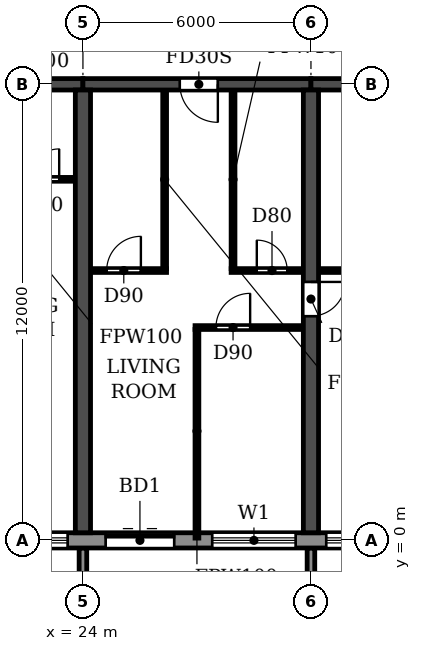
"""IFC4 building model, lengths in metres.
Left out: names, types, materials, properties, quantities, classifications, styles, units other than length and angle.
Written with IfcOpenShell. Run it as: python <this file> out.ifc"""

import sys

from ifc_helpers import new_model, si_unit, direction, frame, frame_2d, origin, place, context, subcontext, project, spatial, polyline, rectangle, outline, extrude, source, transform, mapped, element, fill, save


model = new_model("IFC4")
c1 = context("Model", 3, precision=1e-05, world=origin(), true_north=direction((0.0, 1.0)))
c2 = subcontext(c1, "Body", "Model", "MODEL_VIEW")
j1 = project(units=[si_unit("LENGTHUNIT", "METRE"), si_unit("PLANEANGLEUNIT", "RADIAN")], contexts=[c1])
p1 = place(None, origin())
s1 = spatial("IfcSite", under=j1, at=p1, CompositionType="ELEMENT")
p2 = place(p1, origin())
s2 = spatial("IfcBuilding", under=s1, at=p2, CompositionType="ELEMENT")
p3 = place(p2, frame((0.0, 0.0, 26.7)))
s3 = spatial("IfcBuildingStorey", under=s2, at=p3, CompositionType="ELEMENT", Elevation=26.7)
p4 = place(p3, frame((24.0, 0.2, 0.0), z_axis=(0.0, 0.0, 1.0), x_axis=(0.0, 1.0, 0.0)))
e1 = element("IfcWall", 1, at=p4, inside=s3, PredefinedType="SHEAR", context=c2, shape_type="SweptSolid", body=[
    extrude(rectangle(XDim=11.65, YDim=0.4, at=frame_2d((5.825, 0.0))), origin(), (0.0, 0.0, 1.0), 3.05),
])
p5 = place(p3, frame((30.0, 0.2, 0.0), z_axis=(0.0, 0.0, 1.0), x_axis=(0.0, 1.0, 0.0)))
e2 = element("IfcWall", 2, at=p5, inside=s3, PredefinedType="SHEAR", context=c2, shape_type="SweptSolid", body=[
    extrude(rectangle(XDim=11.65, YDim=0.4, at=frame_2d((5.825, 0.0))), origin(), (0.0, 0.0, 1.0), 3.05),
])
p6 = place(p5, frame((5.7, 0.0, 0.0)))
e3 = element("IfcOpeningElement", 3, at=p6, cuts=e2, PredefinedType="OPENING", context=c2, shape_type="SweptSolid", body=[
    extrude(rectangle(XDim=0.9, YDim=2.1, at=frame_2d((0.45, 1.05))), frame((0.0, 0.21, 0.0), z_axis=(0.0, -1.0, 0.0), x_axis=(1.0, 0.0, 0.0)), (0.0, 0.0, 1.0), 0.42),
])
p7 = place(p3, frame((18.0, 12.0, 0.0), z_axis=(0.0, 0.0, 1.0), x_axis=(1.0, 0.0, 0.0)))
e4 = element("IfcWall", 4, at=p7, inside=s3, PredefinedType="SHEAR", context=c2, shape_type="SweptSolid", body=[
    extrude(rectangle(XDim=6.0, YDim=0.3, at=frame_2d((3.0, 0.0))), origin(), (0.0, 0.0, 1.0), 2.45),
])
p8 = place(p7, frame((2.55, 0.0, 0.0)))
e5 = element("IfcOpeningElement", 5, at=p8, cuts=e4, PredefinedType="OPENING", context=c2, shape_type="SweptSolid", body=[
    extrude(rectangle(XDim=1.0, YDim=2.1, at=frame_2d((0.5, 1.05))), frame((0.0, 0.16, 0.0), z_axis=(0.0, -1.0, 0.0), x_axis=(1.0, 0.0, 0.0)), (0.0, 0.0, 1.0), 0.32),
])
p9 = place(p3, frame((24.0, 12.0, 0.0), z_axis=(0.0, 0.0, 1.0), x_axis=(1.0, 0.0, 0.0)))
e6 = element("IfcWall", 6, at=p9, inside=s3, PredefinedType="SHEAR", context=c2, shape_type="SweptSolid", body=[
    extrude(rectangle(XDim=6.0, YDim=0.3, at=frame_2d((3.0, 0.0))), origin(), (0.0, 0.0, 1.0), 2.45),
])
p10 = place(p9, frame((2.55, 0.0, 0.0)))
e7 = element("IfcOpeningElement", 7, at=p10, cuts=e6, PredefinedType="OPENING", context=c2, shape_type="SweptSolid", body=[
    extrude(rectangle(XDim=1.0, YDim=2.1, at=frame_2d((0.5, 1.05))), frame((0.0, 0.16, 0.0), z_axis=(0.0, -1.0, 0.0), x_axis=(1.0, 0.0, 0.0)), (0.0, 0.0, 1.0), 0.32),
])
p11 = place(p3, frame((30.0, 12.0, 0.0), z_axis=(0.0, 0.0, 1.0), x_axis=(1.0, 0.0, 0.0)))
e8 = element("IfcWall", 8, at=p11, inside=s3, PredefinedType="SHEAR", context=c2, shape_type="SweptSolid", body=[
    extrude(rectangle(XDim=6.0, YDim=0.3, at=frame_2d((3.0, 0.0))), origin(), (0.0, 0.0, 1.0), 2.45),
])
p12 = place(p3, frame((4.683, 0.0, 0.0), z_axis=(0.0, 0.0, 1.0), x_axis=(1.0, 0.0, 0.0)))
e9 = element("IfcWall", 9, at=p12, inside=s3, PredefinedType="STANDARD", context=c2, shape_type="SweptSolid", body=[
    extrude(rectangle(XDim=92.634, YDim=0.4, at=frame_2d((46.317, 0.0))), origin(), (0.0, 0.0, 1.0), 3.05),
])
p13 = place(p12, frame((1.717, 0.0, 0.9)))
e10 = element("IfcOpeningElement", 10, at=p13, cuts=e9, PredefinedType="OPENING", context=c2, shape_type="SweptSolid", body=[
    extrude(rectangle(XDim=2.2, YDim=1.5, at=frame_2d((1.1, 0.75))), frame((0.0, 0.21, 0.0), z_axis=(0.0, -1.0, 0.0), x_axis=(1.0, 0.0, 0.0)), (0.0, 0.0, 1.0), 0.42),
])
p14 = place(p12, frame((4.717, 0.0, 0.9)))
e11 = element("IfcOpeningElement", 11, at=p14, cuts=e9, PredefinedType="OPENING", context=c2, shape_type="SweptSolid", body=[
    extrude(rectangle(XDim=2.2, YDim=1.5, at=frame_2d((1.1, 0.75))), frame((0.0, 0.21, 0.0), z_axis=(0.0, -1.0, 0.0), x_axis=(1.0, 0.0, 0.0)), (0.0, 0.0, 1.0), 0.42),
])
p15 = place(p12, frame((7.717, 0.0, 0.9)))
e12 = element("IfcOpeningElement", 12, at=p15, cuts=e9, PredefinedType="OPENING", context=c2, shape_type="SweptSolid", body=[
    extrude(rectangle(XDim=2.2, YDim=1.5, at=frame_2d((1.1, 0.75))), frame((0.0, 0.21, 0.0), z_axis=(0.0, -1.0, 0.0), x_axis=(1.0, 0.0, 0.0)), (0.0, 0.0, 1.0), 0.42),
])
p16 = place(p12, frame((10.717, 0.0, 0.9)))
e13 = element("IfcOpeningElement", 13, at=p16, cuts=e9, PredefinedType="OPENING", context=c2, shape_type="SweptSolid", body=[
    extrude(rectangle(XDim=2.2, YDim=1.5, at=frame_2d((1.1, 0.75))), frame((0.0, 0.21, 0.0), z_axis=(0.0, -1.0, 0.0), x_axis=(1.0, 0.0, 0.0)), (0.0, 0.0, 1.0), 0.42),
])
p17 = place(p12, frame((13.717, 0.0, 0.9)))
e14 = element("IfcOpeningElement", 14, at=p17, cuts=e9, PredefinedType="OPENING", context=c2, shape_type="SweptSolid", body=[
    extrude(rectangle(XDim=2.2, YDim=1.5, at=frame_2d((1.1, 0.75))), frame((0.0, 0.21, 0.0), z_axis=(0.0, -1.0, 0.0), x_axis=(1.0, 0.0, 0.0)), (0.0, 0.0, 1.0), 0.42),
])
p18 = place(p12, frame((16.717, 0.0, 0.9)))
e15 = element("IfcOpeningElement", 15, at=p18, cuts=e9, PredefinedType="OPENING", context=c2, shape_type="SweptSolid", body=[
    extrude(rectangle(XDim=2.2, YDim=1.5, at=frame_2d((1.1, 0.75))), frame((0.0, 0.21, 0.0), z_axis=(0.0, -1.0, 0.0), x_axis=(1.0, 0.0, 0.0)), (0.0, 0.0, 1.0), 0.42),
])
p19 = place(p12, frame((19.917, 0.0, 0.0)))
e16 = element("IfcOpeningElement", 16, at=p19, cuts=e9, PredefinedType="OPENING", context=c2, shape_type="SweptSolid", body=[
    extrude(rectangle(XDim=1.8, YDim=2.4, at=frame_2d((0.9, 1.2))), frame((0.0, 0.21, 0.0), z_axis=(0.0, -1.0, 0.0), x_axis=(1.0, 0.0, 0.0)), (0.0, 0.0, 1.0), 0.42),
])
p20 = place(p12, frame((22.717, 0.0, 0.9)))
e17 = element("IfcOpeningElement", 17, at=p20, cuts=e9, PredefinedType="OPENING", context=c2, shape_type="SweptSolid", body=[
    extrude(rectangle(XDim=2.2, YDim=1.5, at=frame_2d((1.1, 0.75))), frame((0.0, 0.21, 0.0), z_axis=(0.0, -1.0, 0.0), x_axis=(1.0, 0.0, 0.0)), (0.0, 0.0, 1.0), 0.42),
])
p21 = place(p12, frame((25.717, 0.0, 0.9)))
e18 = element("IfcOpeningElement", 18, at=p21, cuts=e9, PredefinedType="OPENING", context=c2, shape_type="SweptSolid", body=[
    extrude(rectangle(XDim=2.2, YDim=1.5, at=frame_2d((1.1, 0.75))), frame((0.0, 0.21, 0.0), z_axis=(0.0, -1.0, 0.0), x_axis=(1.0, 0.0, 0.0)), (0.0, 0.0, 1.0), 0.42),
])
p22 = place(p12, frame((28.717, 0.0, 0.9)))
e19 = element("IfcOpeningElement", 19, at=p22, cuts=e9, PredefinedType="OPENING", context=c2, shape_type="SweptSolid", body=[
    extrude(rectangle(XDim=2.2, YDim=1.5, at=frame_2d((1.1, 0.75))), frame((0.0, 0.21, 0.0), z_axis=(0.0, -1.0, 0.0), x_axis=(1.0, 0.0, 0.0)), (0.0, 0.0, 1.0), 0.42),
])
p23 = place(p12, frame((31.917, 0.0, 0.0)))
e20 = element("IfcOpeningElement", 20, at=p23, cuts=e9, PredefinedType="OPENING", context=c2, shape_type="SweptSolid", body=[
    extrude(rectangle(XDim=1.8, YDim=2.4, at=frame_2d((0.9, 1.2))), frame((0.0, 0.21, 0.0), z_axis=(0.0, -1.0, 0.0), x_axis=(1.0, 0.0, 0.0)), (0.0, 0.0, 1.0), 0.42),
])
p24 = place(p12, frame((34.717, 0.0, 0.9)))
e21 = element("IfcOpeningElement", 21, at=p24, cuts=e9, PredefinedType="OPENING", context=c2, shape_type="SweptSolid", body=[
    extrude(rectangle(XDim=2.2, YDim=1.5, at=frame_2d((1.1, 0.75))), frame((0.0, 0.21, 0.0), z_axis=(0.0, -1.0, 0.0), x_axis=(1.0, 0.0, 0.0)), (0.0, 0.0, 1.0), 0.42),
])
p25 = place(p12, frame((37.717, 0.0, 0.9)))
e22 = element("IfcOpeningElement", 22, at=p25, cuts=e9, PredefinedType="OPENING", context=c2, shape_type="SweptSolid", body=[
    extrude(rectangle(XDim=2.2, YDim=1.5, at=frame_2d((1.1, 0.75))), frame((0.0, 0.21, 0.0), z_axis=(0.0, -1.0, 0.0), x_axis=(1.0, 0.0, 0.0)), (0.0, 0.0, 1.0), 0.42),
])
p26 = place(p12, frame((40.717, 0.0, 0.9)))
e23 = element("IfcOpeningElement", 23, at=p26, cuts=e9, PredefinedType="OPENING", context=c2, shape_type="SweptSolid", body=[
    extrude(rectangle(XDim=2.2, YDim=1.5, at=frame_2d((1.1, 0.75))), frame((0.0, 0.21, 0.0), z_axis=(0.0, -1.0, 0.0), x_axis=(1.0, 0.0, 0.0)), (0.0, 0.0, 1.0), 0.42),
])
p27 = place(p12, frame((43.917, 0.0, 0.0)))
e24 = element("IfcOpeningElement", 24, at=p27, cuts=e9, PredefinedType="OPENING", context=c2, shape_type="SweptSolid", body=[
    extrude(rectangle(XDim=1.8, YDim=2.4, at=frame_2d((0.9, 1.2))), frame((0.0, 0.21, 0.0), z_axis=(0.0, -1.0, 0.0), x_axis=(1.0, 0.0, 0.0)), (0.0, 0.0, 1.0), 0.42),
])
p28 = place(p12, frame((46.717, 0.0, 0.9)))
e25 = element("IfcOpeningElement", 25, at=p28, cuts=e9, PredefinedType="OPENING", context=c2, shape_type="SweptSolid", body=[
    extrude(rectangle(XDim=2.2, YDim=1.5, at=frame_2d((1.1, 0.75))), frame((0.0, 0.21, 0.0), z_axis=(0.0, -1.0, 0.0), x_axis=(1.0, 0.0, 0.0)), (0.0, 0.0, 1.0), 0.42),
])
p29 = place(p12, frame((49.717, 0.0, 0.9)))
e26 = element("IfcOpeningElement", 26, at=p29, cuts=e9, PredefinedType="OPENING", context=c2, shape_type="SweptSolid", body=[
    extrude(rectangle(XDim=2.2, YDim=1.5, at=frame_2d((1.1, 0.75))), frame((0.0, 0.21, 0.0), z_axis=(0.0, -1.0, 0.0), x_axis=(1.0, 0.0, 0.0)), (0.0, 0.0, 1.0), 0.42),
])
p30 = place(p12, frame((52.717, 0.0, 0.9)))
e27 = element("IfcOpeningElement", 27, at=p30, cuts=e9, PredefinedType="OPENING", context=c2, shape_type="SweptSolid", body=[
    extrude(rectangle(XDim=2.2, YDim=1.5, at=frame_2d((1.1, 0.75))), frame((0.0, 0.21, 0.0), z_axis=(0.0, -1.0, 0.0), x_axis=(1.0, 0.0, 0.0)), (0.0, 0.0, 1.0), 0.42),
])
p31 = place(p12, frame((55.717, 0.0, 0.9)))
e28 = element("IfcOpeningElement", 28, at=p31, cuts=e9, PredefinedType="OPENING", context=c2, shape_type="SweptSolid", body=[
    extrude(rectangle(XDim=2.2, YDim=1.5, at=frame_2d((1.1, 0.75))), frame((0.0, 0.21, 0.0), z_axis=(0.0, -1.0, 0.0), x_axis=(1.0, 0.0, 0.0)), (0.0, 0.0, 1.0), 0.42),
])
p32 = place(p12, frame((58.917, 0.0, 0.0)))
e29 = element("IfcOpeningElement", 29, at=p32, cuts=e9, PredefinedType="OPENING", context=c2, shape_type="SweptSolid", body=[
    extrude(rectangle(XDim=1.8, YDim=2.4, at=frame_2d((0.9, 1.2))), frame((0.0, 0.21, 0.0), z_axis=(0.0, -1.0, 0.0), x_axis=(1.0, 0.0, 0.0)), (0.0, 0.0, 1.0), 0.42),
])
p33 = place(p12, frame((61.717, 0.0, 0.9)))
e30 = element("IfcOpeningElement", 30, at=p33, cuts=e9, PredefinedType="OPENING", context=c2, shape_type="SweptSolid", body=[
    extrude(rectangle(XDim=2.2, YDim=1.5, at=frame_2d((1.1, 0.75))), frame((0.0, 0.21, 0.0), z_axis=(0.0, -1.0, 0.0), x_axis=(1.0, 0.0, 0.0)), (0.0, 0.0, 1.0), 0.42),
])
p34 = place(p12, frame((64.717, 0.0, 0.9)))
e31 = element("IfcOpeningElement", 31, at=p34, cuts=e9, PredefinedType="OPENING", context=c2, shape_type="SweptSolid", body=[
    extrude(rectangle(XDim=2.2, YDim=1.5, at=frame_2d((1.1, 0.75))), frame((0.0, 0.21, 0.0), z_axis=(0.0, -1.0, 0.0), x_axis=(1.0, 0.0, 0.0)), (0.0, 0.0, 1.0), 0.42),
])
p35 = place(p12, frame((67.717, 0.0, 0.9)))
e32 = element("IfcOpeningElement", 32, at=p35, cuts=e9, PredefinedType="OPENING", context=c2, shape_type="SweptSolid", body=[
    extrude(rectangle(XDim=2.2, YDim=1.5, at=frame_2d((1.1, 0.75))), frame((0.0, 0.21, 0.0), z_axis=(0.0, -1.0, 0.0), x_axis=(1.0, 0.0, 0.0)), (0.0, 0.0, 1.0), 0.42),
])
p36 = place(p12, frame((70.917, 0.0, 0.0)))
e33 = element("IfcOpeningElement", 33, at=p36, cuts=e9, PredefinedType="OPENING", context=c2, shape_type="SweptSolid", body=[
    extrude(rectangle(XDim=1.8, YDim=2.4, at=frame_2d((0.9, 1.2))), frame((0.0, 0.21, 0.0), z_axis=(0.0, -1.0, 0.0), x_axis=(1.0, 0.0, 0.0)), (0.0, 0.0, 1.0), 0.42),
])
p37 = place(p12, frame((73.717, 0.0, 0.9)))
e34 = element("IfcOpeningElement", 34, at=p37, cuts=e9, PredefinedType="OPENING", context=c2, shape_type="SweptSolid", body=[
    extrude(rectangle(XDim=2.2, YDim=1.5, at=frame_2d((1.1, 0.75))), frame((0.0, 0.21, 0.0), z_axis=(0.0, -1.0, 0.0), x_axis=(1.0, 0.0, 0.0)), (0.0, 0.0, 1.0), 0.42),
])
p38 = place(p12, frame((76.717, 0.0, 0.9)))
e35 = element("IfcOpeningElement", 35, at=p38, cuts=e9, PredefinedType="OPENING", context=c2, shape_type="SweptSolid", body=[
    extrude(rectangle(XDim=2.2, YDim=1.5, at=frame_2d((1.1, 0.75))), frame((0.0, 0.21, 0.0), z_axis=(0.0, -1.0, 0.0), x_axis=(1.0, 0.0, 0.0)), (0.0, 0.0, 1.0), 0.42),
])
p39 = place(p12, frame((79.717, 0.0, 0.9)))
e36 = element("IfcOpeningElement", 36, at=p39, cuts=e9, PredefinedType="OPENING", context=c2, shape_type="SweptSolid", body=[
    extrude(rectangle(XDim=2.2, YDim=1.5, at=frame_2d((1.1, 0.75))), frame((0.0, 0.21, 0.0), z_axis=(0.0, -1.0, 0.0), x_axis=(1.0, 0.0, 0.0)), (0.0, 0.0, 1.0), 0.42),
])
p40 = place(p12, frame((82.717, 0.0, 0.9)))
e37 = element("IfcOpeningElement", 37, at=p40, cuts=e9, PredefinedType="OPENING", context=c2, shape_type="SweptSolid", body=[
    extrude(rectangle(XDim=2.2, YDim=1.5, at=frame_2d((1.1, 0.75))), frame((0.0, 0.21, 0.0), z_axis=(0.0, -1.0, 0.0), x_axis=(1.0, 0.0, 0.0)), (0.0, 0.0, 1.0), 0.42),
])
p41 = place(p12, frame((85.717, 0.0, 0.9)))
e38 = element("IfcOpeningElement", 38, at=p41, cuts=e9, PredefinedType="OPENING", context=c2, shape_type="SweptSolid", body=[
    extrude(rectangle(XDim=2.2, YDim=1.5, at=frame_2d((1.1, 0.75))), frame((0.0, 0.21, 0.0), z_axis=(0.0, -1.0, 0.0), x_axis=(1.0, 0.0, 0.0)), (0.0, 0.0, 1.0), 0.42),
])
p42 = place(p12, frame((88.717, 0.0, 0.9)))
e39 = element("IfcOpeningElement", 39, at=p42, cuts=e9, PredefinedType="OPENING", context=c2, shape_type="SweptSolid", body=[
    extrude(rectangle(XDim=2.2, YDim=1.5, at=frame_2d((1.1, 0.75))), frame((0.0, 0.21, 0.0), z_axis=(0.0, -1.0, 0.0), x_axis=(1.0, 0.0, 0.0)), (0.0, 0.0, 1.0), 0.42),
])
m1 = source(origin(), c2, "Body", "SweptSolid", [
    extrude(outline(polyline([(0.0, 0.0), (0.2, 0.0), (0.2, 1.65), (0.0, 1.65), (0.0, 0.0)])), origin(), (0.0, 0.0, 1.0), 3.1),
])
for number, where in (
    (40, (23.9, -1.85, 0.0)),
    (41, (29.9, -1.85, 0.0)),
):
    element("IfcWall", number, at=place(p3, frame(where)), inside=s3, PredefinedType="STANDARD", context=c2, shape_type="MappedRepresentation", body=[
        mapped(m1, transform((0.0, 0.0, 0.0))),
    ])
p43 = place(p3, frame((26.95, 5.6, 0.0), z_axis=(0.0, 0.0, 1.0), x_axis=(1.0, 0.0, 0.0)))
e42 = element("IfcWall", 42, at=p43, inside=s3, PredefinedType="PARTITIONING", context=c2, shape_type="SweptSolid", body=[
    extrude(rectangle(XDim=2.84, YDim=0.1, at=frame_2d((1.42, 0.0))), origin(), (0.0, 0.0, 1.0), 3.05),
])
p44 = place(p43, frame((0.55, 0.0, 0.0)))
e43 = element("IfcOpeningElement", 43, at=p44, cuts=e42, PredefinedType="OPENING", context=c2, shape_type="SweptSolid", body=[
    extrude(rectangle(XDim=0.9, YDim=2.1, at=frame_2d((0.45, 1.05))), frame((0.0, 0.06, 0.0), z_axis=(0.0, -1.0, 0.0), x_axis=(1.0, 0.0, 0.0)), (0.0, 0.0, 1.0), 0.12),
])
p45 = place(p3, frame((24.21, 7.1, 0.0), z_axis=(0.0, 0.0, 1.0), x_axis=(1.0, 0.0, 0.0)))
e44 = element("IfcWall", 44, at=p45, inside=s3, PredefinedType="PARTITIONING", context=c2, shape_type="SweptSolid", body=[
    extrude(rectangle(XDim=1.99, YDim=0.1, at=frame_2d((0.995, 0.0))), origin(), (0.0, 0.0, 1.0), 3.05),
])
p46 = place(p45, frame((0.415, 0.0, 0.0)))
e45 = element("IfcOpeningElement", 45, at=p46, cuts=e44, PredefinedType="OPENING", context=c2, shape_type="SweptSolid", body=[
    extrude(rectangle(XDim=0.9, YDim=2.1, at=frame_2d((0.45, 1.05))), frame((0.0, 0.06, 0.0), z_axis=(0.0, -1.0, 0.0), x_axis=(1.0, 0.0, 0.0)), (0.0, 0.0, 1.0), 0.12),
])
p47 = place(p3, frame((27.9, 7.1, 0.0), z_axis=(0.0, 0.0, 1.0), x_axis=(1.0, 0.0, 0.0)))
e46 = element("IfcWall", 46, at=p47, inside=s3, PredefinedType="PARTITIONING", context=c2, shape_type="SweptSolid", body=[
    extrude(rectangle(XDim=1.89, YDim=0.1, at=frame_2d((0.945, 0.0))), origin(), (0.0, 0.0, 1.0), 3.05),
])
p48 = place(p47, frame((0.675, 0.0, 0.0)))
e47 = element("IfcOpeningElement", 47, at=p48, cuts=e46, PredefinedType="OPENING", context=c2, shape_type="SweptSolid", body=[
    extrude(rectangle(XDim=0.8, YDim=2.1, at=frame_2d((0.4, 1.05))), frame((0.0, 0.06, 0.0), z_axis=(0.0, -1.0, 0.0), x_axis=(1.0, 0.0, 0.0)), (0.0, 0.0, 1.0), 0.12),
])
p49 = place(p3, frame((30.21, 7.1, 0.0), z_axis=(0.0, 0.0, 1.0), x_axis=(1.0, 0.0, 0.0)))
e48 = element("IfcWall", 48, at=p49, inside=s3, PredefinedType="PARTITIONING", context=c2, shape_type="SweptSolid", body=[
    extrude(rectangle(XDim=2.69, YDim=0.1, at=frame_2d((1.345, 0.0))), origin(), (0.0, 0.0, 1.0), 3.05),
])
p50 = place(p49, frame((0.89, 0.0, 0.0)))
e49 = element("IfcOpeningElement", 49, at=p50, cuts=e48, PredefinedType="OPENING", context=c2, shape_type="SweptSolid", body=[
    extrude(rectangle(XDim=0.8, YDim=2.1, at=frame_2d((0.4, 1.05))), frame((0.0, 0.06, 0.0), z_axis=(0.0, -1.0, 0.0), x_axis=(1.0, 0.0, 0.0)), (0.0, 0.0, 1.0), 0.12),
])
p51 = place(p3, frame((21.9, 9.5, 0.0), z_axis=(0.0, 0.0, 1.0), x_axis=(1.0, 0.0, 0.0)))
e50 = element("IfcWall", 50, at=p51, inside=s3, PredefinedType="PARTITIONING", context=c2, shape_type="SweptSolid", body=[
    extrude(rectangle(XDim=1.89, YDim=0.1, at=frame_2d((0.945, 0.0))), origin(), (0.0, 0.0, 1.0), 3.05),
])
p52 = place(p51, frame((0.675, 0.0, 0.0)))
e51 = element("IfcOpeningElement", 51, at=p52, cuts=e50, PredefinedType="OPENING", context=c2, shape_type="SweptSolid", body=[
    extrude(rectangle(XDim=0.8, YDim=2.1, at=frame_2d((0.4, 1.05))), frame((0.0, 0.06, 0.0), z_axis=(0.0, -1.0, 0.0), x_axis=(1.0, 0.0, 0.0)), (0.0, 0.0, 1.0), 0.12),
])
p53 = place(p3, frame((26.15, 7.15, 0.0), z_axis=(0.0, 0.0, 1.0), x_axis=(0.0, 1.0, 0.0)))
e52 = element("IfcWall", 52, at=p53, inside=s3, PredefinedType="PARTITIONING", context=c2, shape_type="SweptSolid", body=[
    extrude(rectangle(XDim=4.69, YDim=0.1, at=frame_2d((2.345, 0.0))), origin(), (0.0, 0.0, 1.0), 3.05),
])
p54 = place(p3, frame((27.0, 0.06, 0.0), z_axis=(0.0, 0.0, 1.0), x_axis=(0.0, 1.0, 0.0)))
e53 = element("IfcWall", 53, at=p54, inside=s3, PredefinedType="PARTITIONING", context=c2, shape_type="SweptSolid", body=[
    extrude(rectangle(XDim=5.49, YDim=0.1, at=frame_2d((2.745, 0.0))), origin(), (0.0, 0.0, 1.0), 3.05),
])
p55 = place(p3, frame((27.95, 7.15, 0.0), z_axis=(0.0, 0.0, 1.0), x_axis=(0.0, 1.0, 0.0)))
e54 = element("IfcWall", 54, at=p55, inside=s3, PredefinedType="PARTITIONING", context=c2, shape_type="SweptSolid", body=[
    extrude(rectangle(XDim=4.69, YDim=0.1, at=frame_2d((2.345, 0.0))), origin(), (0.0, 0.0, 1.0), 3.05),
])
p56 = place(p18, origin())
e55 = element("IfcWindow", 55, at=p56, inside=s3, PartitioningType="DOUBLE_PANEL_HORIZONTAL", PredefinedType="WINDOW", context=c2, shape_type="SweptSolid", body=[
    extrude(rectangle(XDim=2.2, YDim=1.5, at=frame_2d((1.1, 0.75))), frame((0.0, 0.03, 0.0), z_axis=(0.0, -1.0, 0.0), x_axis=(1.0, 0.0, 0.0)), (0.0, 0.0, 1.0), 0.06),
])
fill(e15, e55)
p57 = place(p19, origin())
e56 = element("IfcDoor", 56, at=p57, inside=s3, OperationType="DOUBLE_DOOR_SLIDING", PredefinedType="DOOR", context=c2, shape_type="SweptSolid", body=[
    extrude(rectangle(XDim=1.8, YDim=2.4, at=frame_2d((0.9, 1.2))), frame((0.0, 0.025, 0.0), z_axis=(0.0, -1.0, 0.0), x_axis=(1.0, 0.0, 0.0)), (0.0, 0.0, 1.0), 0.05),
])
fill(e16, e56)
p58 = place(p20, origin())
e57 = element("IfcWindow", 57, at=p58, inside=s3, PartitioningType="DOUBLE_PANEL_HORIZONTAL", PredefinedType="WINDOW", context=c2, shape_type="SweptSolid", body=[
    extrude(rectangle(XDim=2.2, YDim=1.5, at=frame_2d((1.1, 0.75))), frame((0.0, 0.03, 0.0), z_axis=(0.0, -1.0, 0.0), x_axis=(1.0, 0.0, 0.0)), (0.0, 0.0, 1.0), 0.06),
])
fill(e17, e57)
p59 = place(p21, origin())
e58 = element("IfcWindow", 58, at=p59, inside=s3, PartitioningType="DOUBLE_PANEL_HORIZONTAL", PredefinedType="WINDOW", context=c2, shape_type="SweptSolid", body=[
    extrude(rectangle(XDim=2.2, YDim=1.5, at=frame_2d((1.1, 0.75))), frame((0.0, 0.03, 0.0), z_axis=(0.0, -1.0, 0.0), x_axis=(1.0, 0.0, 0.0)), (0.0, 0.0, 1.0), 0.06),
])
fill(e18, e58)
p60 = place(p52, origin())
e59 = element("IfcDoor", 59, at=p60, inside=s3, OperationType="SINGLE_SWING_RIGHT", PredefinedType="DOOR", context=c2, shape_type="SweptSolid", body=[
    extrude(rectangle(XDim=0.8, YDim=2.1, at=frame_2d((0.4, 1.05))), frame((0.0, 0.025, 0.0), z_axis=(0.0, -1.0, 0.0), x_axis=(1.0, 0.0, 0.0)), (0.0, 0.0, 1.0), 0.05),
])
fill(e51, e59)
p61 = place(p46, origin())
e60 = element("IfcDoor", 60, at=p61, inside=s3, OperationType="SINGLE_SWING_RIGHT", PredefinedType="DOOR", context=c2, shape_type="SweptSolid", body=[
    extrude(rectangle(XDim=0.9, YDim=2.1, at=frame_2d((0.45, 1.05))), frame((0.0, 0.025, 0.0), z_axis=(0.0, -1.0, 0.0), x_axis=(1.0, 0.0, 0.0)), (0.0, 0.0, 1.0), 0.05),
])
fill(e45, e60)
p62 = place(p10, frame((1.0, 0.0, 0.0), z_axis=(0.0, 0.0, 1.0), x_axis=(-1.0, 0.0, 0.0)))
e61 = element("IfcDoor", 61, at=p62, inside=s3, OperationType="SINGLE_SWING_LEFT", PredefinedType="DOOR", context=c2, shape_type="SweptSolid", body=[
    extrude(rectangle(XDim=1.0, YDim=2.1, at=frame_2d((0.5, 1.05))), frame((0.0, 0.025, 0.0), z_axis=(0.0, -1.0, 0.0), x_axis=(1.0, 0.0, 0.0)), (0.0, 0.0, 1.0), 0.05),
])
fill(e7, e61)
p63 = place(p44, origin())
e62 = element("IfcDoor", 62, at=p63, inside=s3, OperationType="SINGLE_SWING_RIGHT", PredefinedType="DOOR", context=c2, shape_type="SweptSolid", body=[
    extrude(rectangle(XDim=0.9, YDim=2.1, at=frame_2d((0.45, 1.05))), frame((0.0, 0.025, 0.0), z_axis=(0.0, -1.0, 0.0), x_axis=(1.0, 0.0, 0.0)), (0.0, 0.0, 1.0), 0.05),
])
fill(e43, e62)
p64 = place(p48, origin())
e63 = element("IfcDoor", 63, at=p64, inside=s3, OperationType="SINGLE_SWING_LEFT", PredefinedType="DOOR", context=c2, shape_type="SweptSolid", body=[
    extrude(rectangle(XDim=0.8, YDim=2.1, at=frame_2d((0.4, 1.05))), frame((0.0, 0.025, 0.0), z_axis=(0.0, -1.0, 0.0), x_axis=(1.0, 0.0, 0.0)), (0.0, 0.0, 1.0), 0.05),
])
fill(e47, e63)
p65 = place(p6, frame((0.9, 0.0, 0.0), z_axis=(0.0, 0.0, 1.0), x_axis=(-1.0, 0.0, 0.0)))
e64 = element("IfcDoor", 64, at=p65, inside=s3, OperationType="SINGLE_SWING_LEFT", PredefinedType="DOOR", context=c2, shape_type="SweptSolid", body=[
    extrude(rectangle(XDim=0.9, YDim=2.1, at=frame_2d((0.45, 1.05))), frame((0.0, 0.025, 0.0), z_axis=(0.0, -1.0, 0.0), x_axis=(1.0, 0.0, 0.0)), (0.0, 0.0, 1.0), 0.05),
])
fill(e3, e64)
save(model, sys.argv[1])
